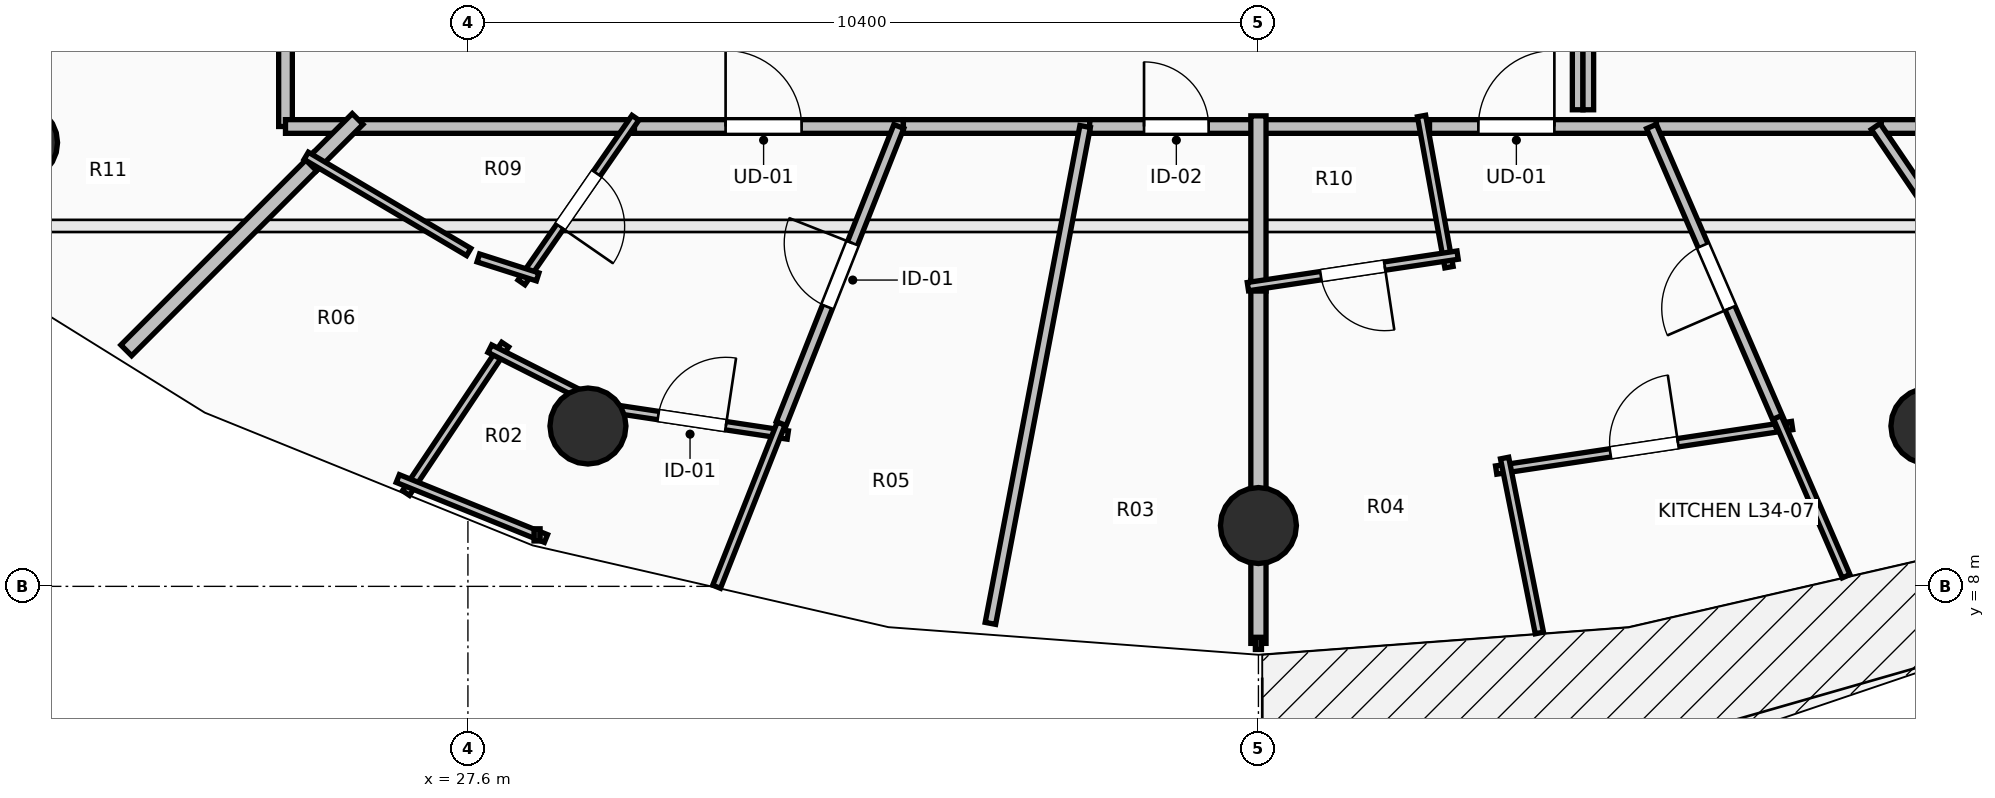
"""IFC4 building model, lengths in metres.
Left out: names, types, materials, properties, quantities, classifications, styles, units other than length and angle.
Written with IfcOpenShell. Run it as: python <this file> out.ifc"""

import sys

from ifc_helpers import new_model, si_unit, direction, frame, frame_2d, origin, origin_2d, place, context, subcontext, project, spatial, rectangle, circle, extrude, element, fill, save


model = new_model("IFC4")
c1 = context("Model", 3, precision=1e-05, world=origin(), true_north=direction((0.0, 1.0)))
c2 = subcontext(c1, "Body", "Model", "MODEL_VIEW")
j1 = project(units=[si_unit("LENGTHUNIT", "METRE"), si_unit("PLANEANGLEUNIT", "RADIAN")], contexts=[c1])
p1 = place(None, origin())
s1 = spatial("IfcSite", under=j1, at=p1, CompositionType="ELEMENT")
p2 = place(p1, origin())
s2 = spatial("IfcBuilding", under=s1, at=p2, CompositionType="ELEMENT")
p3 = place(p2, frame((0.0, 0.0, 129.1)))
s3 = spatial("IfcBuildingStorey", under=s2, at=p3, CompositionType="ELEMENT", Elevation=129.1)
for number, where, z_axis, x_axis in (
    (1, (21.701, 13.838, 0.0), (0.0, 0.0, 1.0), (-0.707, -0.707, 0.0)),
    (2, (29.179, 10.109, 0.0), (0.0, 0.0, 1.0), (-0.383, -0.924, 0.0)),
    (3, (38.0, 8.8, 0.0), (0.0, 0.0, 1.0), (0.0, -1.0, 0.0)),
    (4, (46.821, 10.109, 0.0), (0.0, 0.0, 1.0), (0.383, -0.924, 0.0)),
):
    element("IfcColumn", number, at=place(p3, frame(where, z_axis=z_axis, x_axis=x_axis)), inside=s3, PredefinedType="COLUMN", context=c2, shape_type="SweptSolid", body=[
        extrude(circle(Radius=0.5, at=origin_2d()), origin(), (0.0, 0.0, 1.0), 3.5),
    ])
p4 = place(p3, frame((25.2, 17.228, 0.0), z_axis=(0.0, 0.0, 1.0), x_axis=(0.0, -1.0, 0.0)))
e5 = element("IfcWall", 5, at=p4, inside=s3, PredefinedType="PARTITIONING", context=c2, shape_type="SweptSolid", body=[
    extrude(rectangle(XDim=3.178, YDim=0.18, at=frame_2d((1.589, 0.0))), origin(), (0.0, 0.0, 1.0), 2.432),
])
p5 = place(p4, frame((1.164, 0.0, 0.0)))
e6 = element("IfcOpeningElement", 6, at=p5, cuts=e5, PredefinedType="OPENING", context=c2, shape_type="SweptSolid", body=[
    extrude(rectangle(XDim=0.85, YDim=2.1, at=frame_2d((0.425, 1.05))), frame((0.0, 0.105, 0.0), z_axis=(0.0, -1.0, 0.0), x_axis=(1.0, 0.0, 0.0)), (0.0, 0.0, 1.0), 0.21),
])
p6 = place(p3, frame((25.2, 14.05, 0.0), z_axis=(0.0, 0.0, 1.0), x_axis=(1.0, 0.0, 0.0)))
e7 = element("IfcWall", 7, at=p6, inside=s3, PredefinedType="PARTITIONING", context=c2, shape_type="SweptSolid", body=[
    extrude(rectangle(XDim=0.91, YDim=0.18, at=frame_2d((0.455, 0.0))), origin(), (0.0, 0.0, 1.0), 2.874),
])
p7 = place(p3, frame((29.651, 14.05, 0.0), z_axis=(0.0, 0.0, 1.0), x_axis=(1.0, 0.0, 0.0)))
e8 = element("IfcWall", 8, at=p7, inside=s3, PredefinedType="PARTITIONING", context=c2, shape_type="SweptSolid", body=[
    extrude(rectangle(XDim=3.678, YDim=0.18, at=frame_2d((1.839, 0.0))), origin(), (0.0, 0.0, 1.0), 2.922),
])
p8 = place(p7, frame((1.339, 0.0, 0.0)))
e9 = element("IfcOpeningElement", 9, at=p8, cuts=e8, PredefinedType="OPENING", context=c2, shape_type="SweptSolid", body=[
    extrude(rectangle(XDim=1.0, YDim=2.15, at=frame_2d((0.5, 1.075))), frame((0.0, 0.105, 0.0), z_axis=(0.0, -1.0, 0.0), x_axis=(1.0, 0.0, 0.0)), (0.0, 0.0, 1.0), 0.21),
])
p9 = place(p3, frame((25.97, 14.05, 0.0), z_axis=(0.0, 0.0, 1.0), x_axis=(1.0, 0.0, 0.0)))
e10 = element("IfcWall", 10, at=p9, inside=s3, PredefinedType="PARTITIONING", context=c2, shape_type="SweptSolid", body=[
    extrude(rectangle(XDim=3.821, YDim=0.18, at=frame_2d((1.911, 0.0))), origin(), (0.0, 0.0, 1.0), 2.432),
])
p10 = place(p3, frame((33.329, 14.05, 0.0), z_axis=(0.0, 0.0, 1.0), x_axis=(1.0, 0.0, 0.0)))
e11 = element("IfcWall", 11, at=p10, inside=s3, PredefinedType="PARTITIONING", context=c2, shape_type="SweptSolid", body=[
    extrude(rectangle(XDim=2.451, YDim=0.18, at=frame_2d((1.226, 0.0))), origin(), (0.0, 0.0, 1.0), 2.922),
])
p11 = place(p3, frame((35.78, 14.05, 0.0), z_axis=(0.0, 0.0, 1.0), x_axis=(1.0, 0.0, 0.0)))
e12 = element("IfcWall", 12, at=p11, inside=s3, PredefinedType="PARTITIONING", context=c2, shape_type="SweptSolid", body=[
    extrude(rectangle(XDim=2.28, YDim=0.18, at=frame_2d((1.14, 0.0))), origin(), (0.0, 0.0, 1.0), 2.922),
])
p12 = place(p11, frame((0.715, 0.0, 0.0)))
e13 = element("IfcOpeningElement", 13, at=p12, cuts=e12, PredefinedType="OPENING", context=c2, shape_type="SweptSolid", body=[
    extrude(rectangle(XDim=0.85, YDim=2.1, at=frame_2d((0.425, 1.05))), frame((0.0, 0.105, 0.0), z_axis=(0.0, -1.0, 0.0), x_axis=(1.0, 0.0, 0.0)), (0.0, 0.0, 1.0), 0.21),
])
p13 = place(p3, frame((40.111, 14.05, 0.0), z_axis=(0.0, 0.0, 1.0), x_axis=(1.0, 0.0, 0.0)))
e14 = element("IfcWall", 14, at=p13, inside=s3, PredefinedType="PARTITIONING", context=c2, shape_type="SweptSolid", body=[
    extrude(rectangle(XDim=3.125, YDim=0.18, at=frame_2d((1.562, 0.0))), origin(), (0.0, 0.0, 1.0), 3.24),
])
p14 = place(p13, frame((0.782, 0.0, 0.0)))
e15 = element("IfcOpeningElement", 15, at=p14, cuts=e14, PredefinedType="OPENING", context=c2, shape_type="SweptSolid", body=[
    extrude(rectangle(XDim=1.0, YDim=2.15, at=frame_2d((0.5, 1.075))), frame((0.0, 0.105, 0.0), z_axis=(0.0, -1.0, 0.0), x_axis=(1.0, 0.0, 0.0)), (0.0, 0.0, 1.0), 0.21),
])
p15 = place(p3, frame((37.92, 14.05, 0.0), z_axis=(0.0, 0.0, 1.0), x_axis=(1.0, 0.0, 0.0)))
e16 = element("IfcWall", 16, at=p15, inside=s3, PredefinedType="PARTITIONING", context=c2, shape_type="SweptSolid", body=[
    extrude(rectangle(XDim=2.331, YDim=0.18, at=frame_2d((1.166, 0.0))), origin(), (0.0, 0.0, 1.0), 2.922),
])
p16 = place(p3, frame((43.236, 14.05, 0.0), z_axis=(0.0, 0.0, 1.0), x_axis=(1.0, 0.0, 0.0)))
e17 = element("IfcWall", 17, at=p16, inside=s3, PredefinedType="PARTITIONING", context=c2, shape_type="SweptSolid", body=[
    extrude(rectangle(XDim=2.958, YDim=0.18, at=frame_2d((1.479, 0.0))), origin(), (0.0, 0.0, 1.0), 2.432),
])
p17 = place(p3, frame((46.194, 14.05, 0.0), z_axis=(0.0, 0.0, 1.0), x_axis=(1.0, 0.0, 0.0)))
e18 = element("IfcWall", 18, at=p17, inside=s3, PredefinedType="PARTITIONING", context=c2, shape_type="SweptSolid", body=[
    extrude(rectangle(XDim=3.841, YDim=0.18, at=frame_2d((1.92, 0.0))), origin(), (0.0, 0.0, 1.0), 2.432),
])
p18 = place(p17, frame((1.496, 0.0, 0.0)))
e19 = element("IfcOpeningElement", 19, at=p18, cuts=e18, PredefinedType="OPENING", context=c2, shape_type="SweptSolid", body=[
    extrude(rectangle(XDim=0.85, YDim=2.1, at=frame_2d((0.425, 1.05))), frame((0.0, 0.105, 0.0), z_axis=(0.0, -1.0, 0.0), x_axis=(1.0, 0.0, 0.0)), (0.0, 0.0, 1.0), 0.21),
])
p19 = place(p3, frame((19.627, 13.514, 0.0), z_axis=(0.0, 0.0, 1.0), x_axis=(0.827101009155, 0.562053307663, 0.0)))
e20 = element("IfcWall", 20, at=p19, inside=s3, PredefinedType="PARTITIONING", context=c2, shape_type="SweptSolid", body=[
    extrude(rectangle(XDim=6.738, YDim=0.14, at=frame_2d((3.369, 0.0))), origin(), (0.0, 0.0, 1.0), 2.432),
])
p20 = place(p3, frame((23.105, 11.105, 0.0), z_axis=(0.0, 0.0, 1.0), x_axis=(0.707106781187, 0.707106781187, 0.0)))
e21 = element("IfcWall", 21, at=p20, inside=s3, PredefinedType="PARTITIONING", context=c2, shape_type="SweptSolid", body=[
    extrude(rectangle(XDim=3.581, YDim=0.2, at=frame_2d((1.791, 0.0))), origin(), (0.0, 0.0, 1.0), 2.728),
])
p21 = place(p3, frame((25.538, 13.538, 0.0), z_axis=(0.0, 0.0, 1.0), x_axis=(0.707106781187, 0.707106781187, 0.0)))
e22 = element("IfcWall", 22, at=p21, inside=s3, PredefinedType="PARTITIONING", context=c2, shape_type="SweptSolid", body=[
    extrude(rectangle(XDim=0.864, YDim=0.2, at=frame_2d((0.432, 0.0))), origin(), (0.0, 0.0, 1.0), 2.874),
])
p22 = place(p3, frame((29.804, 14.165, 0.0), z_axis=(0.0, 0.0, 1.0), x_axis=(-0.569156972472, -0.822228885826, 0.0)))
e23 = element("IfcWall", 23, at=p22, inside=s3, PredefinedType="PARTITIONING", context=c2, shape_type="SweptSolid", body=[
    extrude(rectangle(XDim=2.635, YDim=0.11, at=frame_2d((1.317, 0.0))), origin(), (0.0, 0.0, 1.0), 2.432),
])
p23 = place(p22, frame((0.892, 0.0, 0.0)))
e24 = element("IfcOpeningElement", 24, at=p23, cuts=e23, PredefinedType="OPENING", context=c2, shape_type="SweptSolid", body=[
    extrude(rectangle(XDim=0.85, YDim=2.1, at=frame_2d((0.425, 1.05))), frame((0.0, 0.07, 0.0), z_axis=(0.0, -1.0, 0.0), x_axis=(1.0, 0.0, 0.0)), (0.0, 0.0, 1.0), 0.14),
])
p24 = place(p3, frame((28.517, 12.071, 0.0), z_axis=(0.0, 0.0, 1.0), x_axis=(-0.952627998304, 0.304137956932, 0.0)))
e25 = element("IfcWall", 25, at=p24, inside=s3, PredefinedType="PARTITIONING", context=c2, shape_type="SweptSolid", body=[
    extrude(rectangle(XDim=0.82, YDim=0.11, at=frame_2d((0.41, 0.0))), origin(), (0.0, 0.0, 1.0), 2.432),
])
p25 = place(p3, frame((27.611, 12.399, 0.0), z_axis=(0.0, 0.0, 1.0), x_axis=(-0.860546797705, 0.509371386082, 0.0)))
e26 = element("IfcWall", 26, at=p25, inside=s3, PredefinedType="PARTITIONING", context=c2, shape_type="SweptSolid", body=[
    extrude(rectangle(XDim=2.485, YDim=0.11, at=frame_2d((1.242, 0.0))), origin(), (0.0, 0.0, 1.0), 2.874),
])
p26 = place(p3, frame((26.785, 9.228, 0.0), z_axis=(0.0, 0.0, 1.0), x_axis=(0.555802936367, 0.831314077786, 0.0)))
e27 = element("IfcWall", 27, at=p26, inside=s3, PredefinedType="PARTITIONING", context=c2, shape_type="SweptSolid", body=[
    extrude(rectangle(XDim=2.349, YDim=0.11, at=frame_2d((1.175, 0.0))), origin(), (0.0, 0.0, 1.0), 2.728),
])
p27 = place(p3, frame((27.888, 11.127, 0.0), z_axis=(0.0, 0.0, 1.0), x_axis=(0.892534718882, -0.450978686403, 0.0)))
e28 = element("IfcWall", 28, at=p27, inside=s3, PredefinedType="PARTITIONING", context=c2, shape_type="SweptSolid", body=[
    extrude(rectangle(XDim=1.865, YDim=0.11, at=frame_2d((0.933, 0.0))), origin(), (0.0, 0.0, 1.0), 2.432),
])
p28 = place(p3, frame((29.29, 10.37, 0.0), z_axis=(0.0, 0.0, 1.0), x_axis=(0.988887788943, -0.148663851958, 0.0)))
e29 = element("IfcWall", 29, at=p28, inside=s3, PredefinedType="PARTITIONING", context=c2, shape_type="SweptSolid", body=[
    extrude(rectangle(XDim=2.547, YDim=0.11, at=frame_2d((1.273, 0.0))), origin(), (0.0, 0.0, 1.0), 3.24),
])
p29 = place(p28, frame((0.823, 0.0, 0.0)))
e30 = element("IfcOpeningElement", 30, at=p29, cuts=e29, PredefinedType="OPENING", context=c2, shape_type="SweptSolid", body=[
    extrude(rectangle(XDim=0.9, YDim=2.1, at=frame_2d((0.45, 1.05))), frame((0.0, 0.07, 0.0), z_axis=(0.0, -1.0, 0.0), x_axis=(1.0, 0.0, 0.0)), (0.0, 0.0, 1.0), 0.14),
])
p30 = place(p3, frame((31.721, 10.142, 0.0), z_axis=(0.0, 0.0, 1.0), x_axis=(-0.368016079814, -0.929819426017, 0.0)))
e31 = element("IfcWall", 31, at=p30, inside=s3, PredefinedType="PARTITIONING", context=c2, shape_type="SweptSolid", body=[
    extrude(rectangle(XDim=2.309, YDim=0.11, at=frame_2d((1.155, 0.0))), origin(), (0.0, 0.0, 1.0), 2.728),
])
p31 = place(p3, frame((26.677, 9.418, 0.0), z_axis=(0.0, 0.0, 1.0), x_axis=(0.926947774479, -0.375190382857, 0.0)))
e32 = element("IfcWall", 32, at=p31, inside=s3, PredefinedType="PARTITIONING", context=c2, shape_type="SweptSolid", body=[
    extrude(rectangle(XDim=2.103, YDim=0.11, at=frame_2d((1.052, 0.0))), origin(), (0.0, 0.0, 1.0), 3.24),
])
p32 = place(p3, frame((31.722, 10.142, 0.0), z_axis=(0.0, 0.0, 1.0), x_axis=(0.368143652048, 0.929768923688, 0.0)))
e33 = element("IfcWall", 33, at=p32, inside=s3, PredefinedType="PARTITIONING", context=c2, shape_type="SweptSolid", body=[
    extrude(rectangle(XDim=4.203, YDim=0.14, at=frame_2d((2.102, 0.0))), origin(), (0.0, 0.0, 1.0), 2.874),
])
p33 = place(p32, frame((1.652, 0.0, 0.0)))
e34 = element("IfcOpeningElement", 34, at=p33, cuts=e33, PredefinedType="OPENING", context=c2, shape_type="SweptSolid", body=[
    extrude(rectangle(XDim=0.9, YDim=2.1, at=frame_2d((0.45, 1.05))), frame((0.0, 0.085, 0.0), z_axis=(0.0, -1.0, 0.0), x_axis=(1.0, 0.0, 0.0)), (0.0, 0.0, 1.0), 0.17),
])
p34 = place(p3, frame((34.474, 7.513, 0.0), z_axis=(0.0, 0.0, 1.0), x_axis=(0.187211570084, 0.982319616025, 0.0)))
e35 = element("IfcWall", 35, at=p34, inside=s3, PredefinedType="PARTITIONING", context=c2, shape_type="SweptSolid", body=[
    extrude(rectangle(XDim=6.655, YDim=0.14, at=frame_2d((3.327, 0.0))), origin(), (0.0, 0.0, 1.0), 2.728),
])
p35 = place(p3, frame((38.0, 7.25, 0.0), z_axis=(0.0, 0.0, 1.0), x_axis=(0.0, 1.0, 0.0)))
e36 = element("IfcWall", 36, at=p35, inside=s3, PredefinedType="PARTITIONING", context=c2, shape_type="SweptSolid", body=[
    extrude(rectangle(XDim=4.775, YDim=0.2, at=frame_2d((2.387, 0.0))), origin(), (0.0, 0.0, 1.0), 2.874),
])
p36 = place(p3, frame((38.0, 11.885, 0.0), z_axis=(0.0, 0.0, 1.0), x_axis=(0.0, 1.0, 0.0)))
e37 = element("IfcWall", 37, at=p36, inside=s3, PredefinedType="PARTITIONING", context=c2, shape_type="SweptSolid", body=[
    extrude(rectangle(XDim=2.305, YDim=0.2, at=frame_2d((1.152, 0.0))), origin(), (0.0, 0.0, 1.0), 2.922),
])
p37 = place(p3, frame((40.146, 14.188, 0.0), z_axis=(0.0, 0.0, 1.0), x_axis=(0.178662196449, -0.983910473346, 0.0)))
e38 = element("IfcWall", 38, at=p37, inside=s3, PredefinedType="PARTITIONING", context=c2, shape_type="SweptSolid", body=[
    extrude(rectangle(XDim=2.021, YDim=0.11, at=frame_2d((1.01, 0.0))), origin(), (0.0, 0.0, 1.0), 2.922),
])
p38 = place(p3, frame((40.62, 12.358, 0.0), z_axis=(0.0, 0.0, 1.0), x_axis=(-0.988884941862, -0.148682789046, 0.0)))
e39 = element("IfcWall", 39, at=p38, inside=s3, PredefinedType="PARTITIONING", context=c2, shape_type="SweptSolid", body=[
    extrude(rectangle(XDim=2.79, YDim=0.11, at=frame_2d((1.395, 0.0))), origin(), (0.0, 0.0, 1.0), 3.24),
])
p39 = place(p38, frame((0.97, 0.0, 0.0)))
e40 = element("IfcOpeningElement", 40, at=p39, cuts=e39, PredefinedType="OPENING", context=c2, shape_type="SweptSolid", body=[
    extrude(rectangle(XDim=0.85, YDim=2.1, at=frame_2d((0.425, 1.05))), frame((0.0, 0.07, 0.0), z_axis=(0.0, -1.0, 0.0), x_axis=(1.0, 0.0, 0.0)), (0.0, 0.0, 1.0), 0.14),
])
p40 = place(p3, frame((41.128, 9.53, 0.0), z_axis=(0.0, 0.0, 1.0), x_axis=(0.988884902331, 0.148683051965, 0.0)))
e41 = element("IfcWall", 41, at=p40, inside=s3, PredefinedType="PARTITIONING", context=c2, shape_type="SweptSolid", body=[
    extrude(rectangle(XDim=3.938, YDim=0.11, at=frame_2d((1.969, 0.0))), origin(), (0.0, 0.0, 1.0), 3.24),
])
p41 = place(p40, frame((1.519, 0.0, 0.0)))
e42 = element("IfcOpeningElement", 42, at=p41, cuts=e41, PredefinedType="OPENING", context=c2, shape_type="SweptSolid", body=[
    extrude(rectangle(XDim=0.9, YDim=2.1, at=frame_2d((0.45, 1.05))), frame((0.0, 0.07, 0.0), z_axis=(0.0, -1.0, 0.0), x_axis=(1.0, 0.0, 0.0)), (0.0, 0.0, 1.0), 0.14),
])
p42 = place(p3, frame((41.696, 7.387, 0.0), z_axis=(0.0, 0.0, 1.0), x_axis=(-0.194975537261, 0.980808105528, 0.0)))
e43 = element("IfcWall", 43, at=p42, inside=s3, PredefinedType="PARTITIONING", context=c2, shape_type="SweptSolid", body=[
    extrude(rectangle(XDim=2.346, YDim=0.11, at=frame_2d((1.173, 0.0))), origin(), (0.0, 0.0, 1.0), 2.728),
])
p43 = place(p3, frame((44.883, 10.095, 0.0), z_axis=(0.0, 0.0, 1.0), x_axis=(-0.397273563399, 0.917700232006, 0.0)))
e44 = element("IfcWall", 44, at=p43, inside=s3, PredefinedType="PARTITIONING", context=c2, shape_type="SweptSolid", body=[
    extrude(rectangle(XDim=4.31, YDim=0.14, at=frame_2d((2.155, 0.0))), origin(), (0.0, 0.0, 1.0), 2.432),
])
p44 = place(p43, frame((1.705, 0.0, 0.0)))
e45 = element("IfcOpeningElement", 45, at=p44, cuts=e44, PredefinedType="OPENING", context=c2, shape_type="SweptSolid", body=[
    extrude(rectangle(XDim=0.9, YDim=2.1, at=frame_2d((0.45, 1.05))), frame((0.0, 0.085, 0.0), z_axis=(0.0, -1.0, 0.0), x_axis=(1.0, 0.0, 0.0)), (0.0, 0.0, 1.0), 0.17),
])
p45 = place(p3, frame((45.732, 8.134, 0.0), z_axis=(0.0, 0.0, 1.0), x_axis=(-0.397125966554, 0.91776411277, 0.0)))
e46 = element("IfcWall", 46, at=p45, inside=s3, PredefinedType="PARTITIONING", context=c2, shape_type="SweptSolid", body=[
    extrude(rectangle(XDim=2.277, YDim=0.11, at=frame_2d((1.139, 0.0))), origin(), (0.0, 0.0, 1.0), 2.728),
])
p46 = place(p3, frame((49.28, 9.402, 0.0), z_axis=(0.0, 0.0, 1.0), x_axis=(-0.562106811751, 0.827064648128, 0.0)))
e47 = element("IfcWall", 47, at=p46, inside=s3, PredefinedType="PARTITIONING", context=c2, shape_type="SweptSolid", body=[
    extrude(rectangle(XDim=5.62, YDim=0.14, at=frame_2d((2.81, 0.0))), origin(), (0.0, 0.0, 1.0), 2.432),
])
for number, where, z_axis, x_axis in (
    (48, (42.2, 16.1, 0.0), (0.0, 0.0, 1.0), (0.0, -1.0, 0.0)),
    (49, (42.34, 14.27, 0.0), (0.0, 0.0, 1.0), (0.0, 1.0, 0.0)),
):
    element("IfcWall", number, at=place(p3, frame(where, z_axis=z_axis, x_axis=x_axis)), inside=s3, PredefinedType="PARTITIONING", context=c2, shape_type="SweptSolid", body=[
        extrude(rectangle(XDim=1.83, YDim=0.14, at=frame_2d((0.915, 0.0))), origin(), (0.0, 0.0, 1.0), 3.24),
    ])
p47 = place(p8, origin())
e50 = element("IfcDoor", 50, at=p47, inside=s3, OperationType="SINGLE_SWING_LEFT", PredefinedType="DOOR", context=c2, shape_type="SweptSolid", body=[
    extrude(rectangle(XDim=1.0, YDim=2.15, at=frame_2d((0.5, 1.075))), frame((0.0, 0.025, 0.0), z_axis=(0.0, -1.0, 0.0), x_axis=(1.0, 0.0, 0.0)), (0.0, 0.0, 1.0), 0.05),
])
fill(e9, e50)
p48 = place(p14, origin())
e51 = element("IfcDoor", 51, at=p48, inside=s3, OperationType="SINGLE_SWING_RIGHT", PredefinedType="DOOR", context=c2, shape_type="SweptSolid", body=[
    extrude(rectangle(XDim=1.0, YDim=2.15, at=frame_2d((0.5, 1.075))), frame((0.0, 0.025, 0.0), z_axis=(0.0, -1.0, 0.0), x_axis=(1.0, 0.0, 0.0)), (0.0, 0.0, 1.0), 0.05),
])
fill(e15, e51)
p49 = place(p23, origin())
e52 = element("IfcDoor", 52, at=p49, inside=s3, OperationType="SINGLE_SWING_RIGHT", PredefinedType="DOOR", context=c2, shape_type="SweptSolid", body=[
    extrude(rectangle(XDim=0.85, YDim=2.1, at=frame_2d((0.425, 1.05))), frame((0.0, 0.025, 0.0), z_axis=(0.0, -1.0, 0.0), x_axis=(1.0, 0.0, 0.0)), (0.0, 0.0, 1.0), 0.05),
])
fill(e24, e52)
p50 = place(p29, origin())
e53 = element("IfcDoor", 53, at=p50, inside=s3, OperationType="SINGLE_SWING_RIGHT", PredefinedType="DOOR", context=c2, shape_type="SweptSolid", body=[
    extrude(rectangle(XDim=0.9, YDim=2.1, at=frame_2d((0.45, 1.05))), frame((0.0, 0.025, 0.0), z_axis=(0.0, -1.0, 0.0), x_axis=(1.0, 0.0, 0.0)), (0.0, 0.0, 1.0), 0.05),
])
fill(e30, e53)
p51 = place(p33, origin())
e54 = element("IfcDoor", 54, at=p51, inside=s3, OperationType="SINGLE_SWING_RIGHT", PredefinedType="DOOR", context=c2, shape_type="SweptSolid", body=[
    extrude(rectangle(XDim=0.9, YDim=2.1, at=frame_2d((0.45, 1.05))), frame((0.0, 0.025, 0.0), z_axis=(0.0, -1.0, 0.0), x_axis=(1.0, 0.0, 0.0)), (0.0, 0.0, 1.0), 0.05),
])
fill(e34, e54)
p52 = place(p39, origin())
e55 = element("IfcDoor", 55, at=p52, inside=s3, OperationType="SINGLE_SWING_LEFT", PredefinedType="DOOR", context=c2, shape_type="SweptSolid", body=[
    extrude(rectangle(XDim=0.85, YDim=2.1, at=frame_2d((0.425, 1.05))), frame((0.0, 0.025, 0.0), z_axis=(0.0, -1.0, 0.0), x_axis=(1.0, 0.0, 0.0)), (0.0, 0.0, 1.0), 0.05),
])
fill(e40, e55)
p53 = place(p41, origin())
e56 = element("IfcDoor", 56, at=p53, inside=s3, OperationType="SINGLE_SWING_RIGHT", PredefinedType="DOOR", context=c2, shape_type="SweptSolid", body=[
    extrude(rectangle(XDim=0.9, YDim=2.1, at=frame_2d((0.45, 1.05))), frame((0.0, 0.025, 0.0), z_axis=(0.0, -1.0, 0.0), x_axis=(1.0, 0.0, 0.0)), (0.0, 0.0, 1.0), 0.05),
])
fill(e42, e56)
p54 = place(p44, origin())
e57 = element("IfcDoor", 57, at=p54, inside=s3, OperationType="SINGLE_SWING_LEFT", PredefinedType="DOOR", context=c2, shape_type="SweptSolid", body=[
    extrude(rectangle(XDim=0.9, YDim=2.1, at=frame_2d((0.45, 1.05))), frame((0.0, 0.025, 0.0), z_axis=(0.0, -1.0, 0.0), x_axis=(1.0, 0.0, 0.0)), (0.0, 0.0, 1.0), 0.05),
])
fill(e45, e57)
p55 = place(p12, origin())
e58 = element("IfcDoor", 58, at=p55, inside=s3, OperationType="SINGLE_SWING_LEFT", PredefinedType="DOOR", context=c2, shape_type="SweptSolid", body=[
    extrude(rectangle(XDim=0.85, YDim=2.1, at=frame_2d((0.425, 1.05))), frame((0.0, 0.025, 0.0), z_axis=(0.0, -1.0, 0.0), x_axis=(1.0, 0.0, 0.0)), (0.0, 0.0, 1.0), 0.05),
])
fill(e13, e58)
save(model, sys.argv[1])
